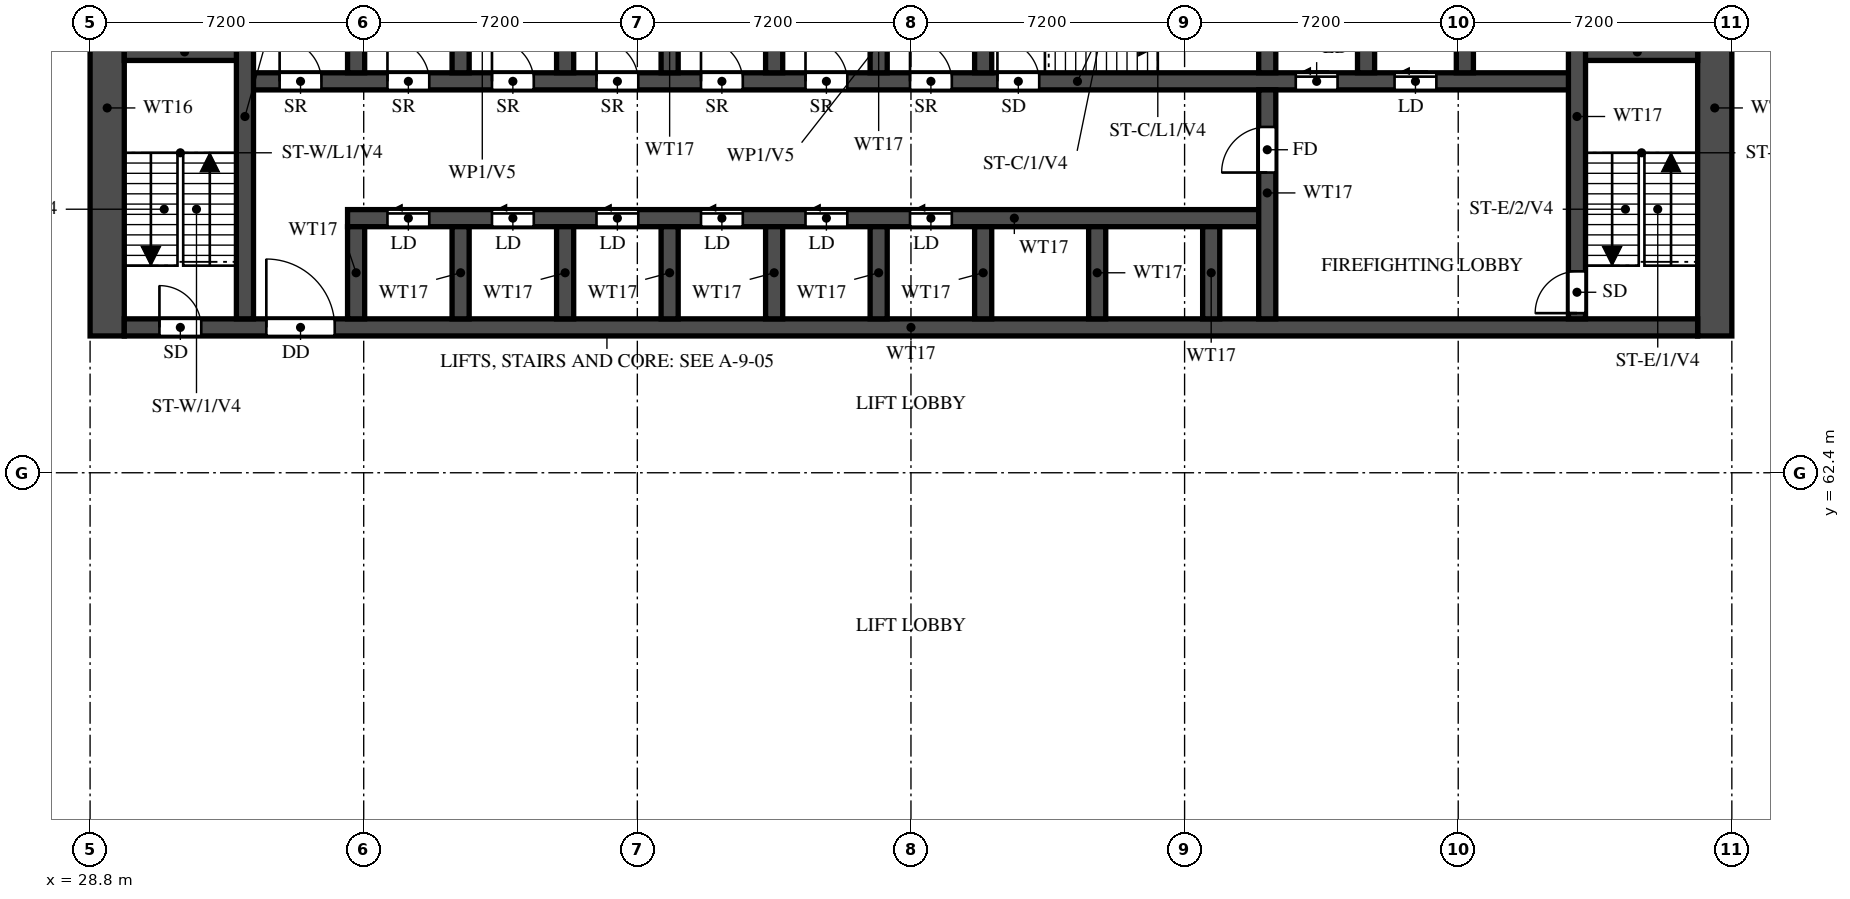
"""IFC4 building model, lengths in metres.
Left out: names, types, materials, properties, quantities, classifications, styles, units other than length and angle.
Written with IfcOpenShell. Run it as: python <this file> out.ifc"""

import sys

from ifc_helpers import new_model, si_unit, direction, frame, frame_2d, origin, place, context, subcontext, project, spatial, rectangle, extrude, element, fill, save


model = new_model("IFC4")
c1 = context("Model", 3, precision=1e-05, world=origin(), true_north=direction((0.0, 1.0)))
c2 = subcontext(c1, "Body", "Model", "MODEL_VIEW")
j1 = project(units=[si_unit("LENGTHUNIT", "METRE"), si_unit("PLANEANGLEUNIT", "RADIAN")], contexts=[c1])
p1 = place(None, origin())
s1 = spatial("IfcSite", under=j1, at=p1, CompositionType="ELEMENT")
p2 = place(p1, origin())
s2 = spatial("IfcBuilding", under=s1, at=p2, CompositionType="ELEMENT")
p3 = place(p2, frame((0.0, 0.0, 17.4)))
s3 = spatial("IfcBuildingStorey", under=s2, at=p3, CompositionType="ELEMENT", Elevation=17.4)
for number, where, z_axis, x_axis in (
    (1, (29.25, 66.0, 0.0), (0.0, 0.0, 1.0), (0.0, 1.0, 0.0)),
    (2, (71.55, 66.0, 0.0), (0.0, 0.0, 1.0), (0.0, 1.0, 0.0)),
):
    element("IfcWall", number, at=place(p3, frame(where, z_axis=z_axis, x_axis=x_axis)), inside=s3, PredefinedType="SHEAR", context=c2, shape_type="SweptSolid", body=[
        extrude(rectangle(XDim=12.0, YDim=0.9, at=frame_2d((6.0, 0.0))), origin(), (0.0, 0.0, 1.0), 3.8),
    ])
p4 = place(p3, frame((29.7, 66.225, 0.0), z_axis=(0.0, 0.0, 1.0), x_axis=(1.0, 0.0, 0.0)))
e3 = element("IfcWall", 3, at=p4, inside=s3, PredefinedType="SHEAR", context=c2, shape_type="SweptSolid", body=[
    extrude(rectangle(XDim=41.4, YDim=0.45, at=frame_2d((20.7, 0.0))), origin(), (0.0, 0.0, 1.0), 3.8),
])
p5 = place(p4, frame((0.925, 0.0, 0.0)))
e4 = element("IfcOpeningElement", 4, at=p5, cuts=e3, PredefinedType="OPENING", context=c2, shape_type="SweptSolid", body=[
    extrude(rectangle(XDim=1.1, YDim=2.1, at=frame_2d((0.55, 1.05))), frame((0.0, 0.235, 0.0), z_axis=(0.0, -1.0, 0.0), x_axis=(1.0, 0.0, 0.0)), (0.0, 0.0, 1.0), 0.47),
])
p6 = place(p4, frame((3.738, 0.0, 0.0)))
e5 = element("IfcOpeningElement", 5, at=p6, cuts=e3, PredefinedType="OPENING", context=c2, shape_type="SweptSolid", body=[
    extrude(rectangle(XDim=1.8, YDim=2.1, at=frame_2d((0.9, 1.05))), frame((0.0, 0.235, 0.0), z_axis=(0.0, -1.0, 0.0), x_axis=(1.0, 0.0, 0.0)), (0.0, 0.0, 1.0), 0.47),
])
p7 = place(p3, frame((35.575, 69.1, 0.0), z_axis=(0.0, 0.0, 1.0), x_axis=(1.0, 0.0, 0.0)))
e6 = element("IfcWall", 6, at=p7, inside=s3, PredefinedType="SHEAR", context=c2, shape_type="SweptSolid", body=[
    extrude(rectangle(XDim=24.2, YDim=0.45, at=frame_2d((12.1, 0.0))), origin(), (0.0, 0.0, 1.0), 3.8),
])
p8 = place(p7, frame((1.05, 0.0, 0.0)))
e7 = element("IfcOpeningElement", 7, at=p8, cuts=e6, PredefinedType="OPENING", context=c2, shape_type="SweptSolid", body=[
    extrude(rectangle(XDim=1.1, YDim=2.1, at=frame_2d((0.55, 1.05))), frame((0.0, 0.235, 0.0), z_axis=(0.0, -1.0, 0.0), x_axis=(1.0, 0.0, 0.0)), (0.0, 0.0, 1.0), 0.47),
])
p9 = place(p7, frame((3.8, 0.0, 0.0)))
e8 = element("IfcOpeningElement", 8, at=p9, cuts=e6, PredefinedType="OPENING", context=c2, shape_type="SweptSolid", body=[
    extrude(rectangle(XDim=1.1, YDim=2.1, at=frame_2d((0.55, 1.05))), frame((0.0, 0.235, 0.0), z_axis=(0.0, -1.0, 0.0), x_axis=(1.0, 0.0, 0.0)), (0.0, 0.0, 1.0), 0.47),
])
p10 = place(p7, frame((6.55, 0.0, 0.0)))
e9 = element("IfcOpeningElement", 9, at=p10, cuts=e6, PredefinedType="OPENING", context=c2, shape_type="SweptSolid", body=[
    extrude(rectangle(XDim=1.1, YDim=2.1, at=frame_2d((0.55, 1.05))), frame((0.0, 0.235, 0.0), z_axis=(0.0, -1.0, 0.0), x_axis=(1.0, 0.0, 0.0)), (0.0, 0.0, 1.0), 0.47),
])
p11 = place(p7, frame((9.3, 0.0, 0.0)))
e10 = element("IfcOpeningElement", 10, at=p11, cuts=e6, PredefinedType="OPENING", context=c2, shape_type="SweptSolid", body=[
    extrude(rectangle(XDim=1.1, YDim=2.1, at=frame_2d((0.55, 1.05))), frame((0.0, 0.235, 0.0), z_axis=(0.0, -1.0, 0.0), x_axis=(1.0, 0.0, 0.0)), (0.0, 0.0, 1.0), 0.47),
])
p12 = place(p7, frame((12.05, 0.0, 0.0)))
e11 = element("IfcOpeningElement", 11, at=p12, cuts=e6, PredefinedType="OPENING", context=c2, shape_type="SweptSolid", body=[
    extrude(rectangle(XDim=1.1, YDim=2.1, at=frame_2d((0.55, 1.05))), frame((0.0, 0.235, 0.0), z_axis=(0.0, -1.0, 0.0), x_axis=(1.0, 0.0, 0.0)), (0.0, 0.0, 1.0), 0.47),
])
p13 = place(p7, frame((14.8, 0.0, 0.0)))
e12 = element("IfcOpeningElement", 12, at=p13, cuts=e6, PredefinedType="OPENING", context=c2, shape_type="SweptSolid", body=[
    extrude(rectangle(XDim=1.1, YDim=2.1, at=frame_2d((0.55, 1.05))), frame((0.0, 0.235, 0.0), z_axis=(0.0, -1.0, 0.0), x_axis=(1.0, 0.0, 0.0)), (0.0, 0.0, 1.0), 0.47),
])
p14 = place(p3, frame((32.875, 72.7, 0.0), z_axis=(0.0, 0.0, 1.0), x_axis=(1.0, 0.0, 0.0)))
e13 = element("IfcWall", 13, at=p14, inside=s3, PredefinedType="SHEAR", context=c2, shape_type="SweptSolid", body=[
    extrude(rectangle(XDim=35.05, YDim=0.45, at=frame_2d((17.525, 0.0))), origin(), (0.0, 0.0, 1.0), 3.8),
])
p15 = place(p14, frame((19.8, 0.0, 0.0)))
e14 = element("IfcOpeningElement", 14, at=p15, cuts=e13, PredefinedType="OPENING", context=c2, shape_type="SweptSolid", body=[
    extrude(rectangle(XDim=1.1, YDim=2.1, at=frame_2d((0.55, 1.05))), frame((0.0, 0.235, 0.0), z_axis=(0.0, -1.0, 0.0), x_axis=(1.0, 0.0, 0.0)), (0.0, 0.0, 1.0), 0.47),
])
p16 = place(p14, frame((27.65, 0.0, 0.0)))
e15 = element("IfcOpeningElement", 15, at=p16, cuts=e13, PredefinedType="OPENING", context=c2, shape_type="SweptSolid", body=[
    extrude(rectangle(XDim=1.1, YDim=2.1, at=frame_2d((0.55, 1.05))), frame((0.0, 0.235, 0.0), z_axis=(0.0, -1.0, 0.0), x_axis=(1.0, 0.0, 0.0)), (0.0, 0.0, 1.0), 0.47),
])
p17 = place(p14, frame((30.25, 0.0, 0.0)))
e16 = element("IfcOpeningElement", 16, at=p17, cuts=e13, PredefinedType="OPENING", context=c2, shape_type="SweptSolid", body=[
    extrude(rectangle(XDim=1.1, YDim=2.1, at=frame_2d((0.55, 1.05))), frame((0.0, 0.235, 0.0), z_axis=(0.0, -1.0, 0.0), x_axis=(1.0, 0.0, 0.0)), (0.0, 0.0, 1.0), 0.47),
])
p18 = place(p14, frame((3.75, 0.0, 0.0)))
e17 = element("IfcOpeningElement", 17, at=p18, cuts=e13, PredefinedType="OPENING", context=c2, shape_type="SweptSolid", body=[
    extrude(rectangle(XDim=1.1, YDim=2.1, at=frame_2d((0.55, 1.05))), frame((0.0, 0.235, 0.0), z_axis=(0.0, -1.0, 0.0), x_axis=(1.0, 0.0, 0.0)), (0.0, 0.0, 1.0), 0.47),
])
p19 = place(p14, frame((6.5, 0.0, 0.0)))
e18 = element("IfcOpeningElement", 18, at=p19, cuts=e13, PredefinedType="OPENING", context=c2, shape_type="SweptSolid", body=[
    extrude(rectangle(XDim=1.1, YDim=2.1, at=frame_2d((0.55, 1.05))), frame((0.0, 0.235, 0.0), z_axis=(0.0, -1.0, 0.0), x_axis=(1.0, 0.0, 0.0)), (0.0, 0.0, 1.0), 0.47),
])
p20 = place(p14, frame((9.25, 0.0, 0.0)))
e19 = element("IfcOpeningElement", 19, at=p20, cuts=e13, PredefinedType="OPENING", context=c2, shape_type="SweptSolid", body=[
    extrude(rectangle(XDim=1.1, YDim=2.1, at=frame_2d((0.55, 1.05))), frame((0.0, 0.235, 0.0), z_axis=(0.0, -1.0, 0.0), x_axis=(1.0, 0.0, 0.0)), (0.0, 0.0, 1.0), 0.47),
])
p21 = place(p14, frame((12.0, 0.0, 0.0)))
e20 = element("IfcOpeningElement", 20, at=p21, cuts=e13, PredefinedType="OPENING", context=c2, shape_type="SweptSolid", body=[
    extrude(rectangle(XDim=1.1, YDim=2.1, at=frame_2d((0.55, 1.05))), frame((0.0, 0.235, 0.0), z_axis=(0.0, -1.0, 0.0), x_axis=(1.0, 0.0, 0.0)), (0.0, 0.0, 1.0), 0.47),
])
p22 = place(p14, frame((14.75, 0.0, 0.0)))
e21 = element("IfcOpeningElement", 21, at=p22, cuts=e13, PredefinedType="OPENING", context=c2, shape_type="SweptSolid", body=[
    extrude(rectangle(XDim=1.1, YDim=2.1, at=frame_2d((0.55, 1.05))), frame((0.0, 0.235, 0.0), z_axis=(0.0, -1.0, 0.0), x_axis=(1.0, 0.0, 0.0)), (0.0, 0.0, 1.0), 0.47),
])
p23 = place(p14, frame((17.5, 0.0, 0.0)))
e22 = element("IfcOpeningElement", 22, at=p23, cuts=e13, PredefinedType="OPENING", context=c2, shape_type="SweptSolid", body=[
    extrude(rectangle(XDim=1.1, YDim=2.1, at=frame_2d((0.55, 1.05))), frame((0.0, 0.235, 0.0), z_axis=(0.0, -1.0, 0.0), x_axis=(1.0, 0.0, 0.0)), (0.0, 0.0, 1.0), 0.47),
])
p24 = place(p14, frame((0.913, 0.0, 0.0)))
e23 = element("IfcOpeningElement", 23, at=p24, cuts=e13, PredefinedType="OPENING", context=c2, shape_type="SweptSolid", body=[
    extrude(rectangle(XDim=1.1, YDim=2.1, at=frame_2d((0.55, 1.05))), frame((0.0, 0.235, 0.0), z_axis=(0.0, -1.0, 0.0), x_axis=(1.0, 0.0, 0.0)), (0.0, 0.0, 1.0), 0.47),
])
for number, where, z_axis, x_axis in (
    (24, (29.7, 73.475, 0.0), (0.0, 0.0, 1.0), (1.0, 0.0, 0.0)),
    (25, (67.925, 73.475, 0.0), (0.0, 0.0, 1.0), (1.0, 0.0, 0.0)),
):
    element("IfcWall", number, at=place(p3, frame(where, z_axis=z_axis, x_axis=x_axis)), inside=s3, PredefinedType="SHEAR", context=c2, shape_type="SweptSolid", body=[
        extrude(rectangle(XDim=3.175, YDim=0.45, at=frame_2d((1.587, 0.0))), origin(), (0.0, 0.0, 1.0), 3.8),
    ])
p25 = place(p3, frame((32.875, 66.45, 0.0), z_axis=(0.0, 0.0, 1.0), x_axis=(0.0, 1.0, 0.0)))
e26 = element("IfcWall", 26, at=p25, inside=s3, PredefinedType="SHEAR", context=c2, shape_type="SweptSolid", body=[
    extrude(rectangle(XDim=10.65, YDim=0.45, at=frame_2d((5.325, 0.0))), origin(), (0.0, 0.0, 1.0), 3.8),
])
p26 = place(p3, frame((67.925, 66.45, 0.0), z_axis=(0.0, 0.0, 1.0), x_axis=(0.0, 1.0, 0.0)))
e27 = element("IfcWall", 27, at=p26, inside=s3, PredefinedType="SHEAR", context=c2, shape_type="SweptSolid", body=[
    extrude(rectangle(XDim=10.65, YDim=0.45, at=frame_2d((5.325, 0.0))), origin(), (0.0, 0.0, 1.0), 3.8),
])
p27 = place(p26, frame((0.15, 0.0, 0.0)))
e28 = element("IfcOpeningElement", 28, at=p27, cuts=e27, PredefinedType="OPENING", context=c2, shape_type="SweptSolid", body=[
    extrude(rectangle(XDim=1.1, YDim=2.1, at=frame_2d((0.55, 1.05))), frame((0.0, 0.235, 0.0), z_axis=(0.0, -1.0, 0.0), x_axis=(1.0, 0.0, 0.0)), (0.0, 0.0, 1.0), 0.47),
])
p28 = place(p3, frame((59.775, 66.45, 0.0), z_axis=(0.0, 0.0, 1.0), x_axis=(0.0, 1.0, 0.0)))
e29 = element("IfcWall", 29, at=p28, inside=s3, PredefinedType="SHEAR", context=c2, shape_type="SweptSolid", body=[
    extrude(rectangle(XDim=6.025, YDim=0.45, at=frame_2d((3.013, 0.0))), origin(), (0.0, 0.0, 1.0), 3.8),
])
p29 = place(p28, frame((3.85, 0.0, 0.0)))
e30 = element("IfcOpeningElement", 30, at=p29, cuts=e29, PredefinedType="OPENING", context=c2, shape_type="SweptSolid", body=[
    extrude(rectangle(XDim=1.2, YDim=2.1, at=frame_2d((0.6, 1.05))), frame((0.0, 0.235, 0.0), z_axis=(0.0, -1.0, 0.0), x_axis=(1.0, 0.0, 0.0)), (0.0, 0.0, 1.0), 0.47),
])
p30 = place(p3, frame((59.775, 72.925, 0.0), z_axis=(0.0, 0.0, 1.0), x_axis=(0.0, 1.0, 0.0)))
e31 = element("IfcWall", 31, at=p30, inside=s3, PredefinedType="SHEAR", context=c2, shape_type="SweptSolid", body=[
    extrude(rectangle(XDim=2.95, YDim=0.45, at=frame_2d((1.475, 0.0))), origin(), (0.0, 0.0, 1.0), 3.8),
])
for number, where, z_axis, x_axis in (
    (32, (35.8, 66.45, 0.0), (0.0, 0.0, 1.0), (0.0, 1.0, 0.0)),
    (33, (38.55, 66.45, 0.0), (0.0, 0.0, 1.0), (0.0, 1.0, 0.0)),
    (34, (41.3, 66.45, 0.0), (0.0, 0.0, 1.0), (0.0, 1.0, 0.0)),
    (35, (44.05, 66.45, 0.0), (0.0, 0.0, 1.0), (0.0, 1.0, 0.0)),
    (36, (46.8, 66.45, 0.0), (0.0, 0.0, 1.0), (0.0, 1.0, 0.0)),
    (37, (49.55, 66.45, 0.0), (0.0, 0.0, 1.0), (0.0, 1.0, 0.0)),
    (38, (52.3, 66.45, 0.0), (0.0, 0.0, 1.0), (0.0, 1.0, 0.0)),
    (39, (55.3, 66.45, 0.0), (0.0, 0.0, 1.0), (0.0, 1.0, 0.0)),
    (40, (58.3, 66.45, 0.0), (0.0, 0.0, 1.0), (0.0, 1.0, 0.0)),
):
    element("IfcWall", number, at=place(p3, frame(where, z_axis=z_axis, x_axis=x_axis)), inside=s3, PredefinedType="SHEAR", context=c2, shape_type="SweptSolid", body=[
        extrude(rectangle(XDim=2.425, YDim=0.45, at=frame_2d((1.212, 0.0))), origin(), (0.0, 0.0, 1.0), 3.8),
    ])
for number, where, z_axis, x_axis in (
    (41, (35.8, 72.925, 0.0), (0.0, 0.0, 1.0), (0.0, 1.0, 0.0)),
    (42, (38.55, 72.925, 0.0), (0.0, 0.0, 1.0), (0.0, 1.0, 0.0)),
    (43, (41.3, 72.925, 0.0), (0.0, 0.0, 1.0), (0.0, 1.0, 0.0)),
    (44, (44.05, 72.925, 0.0), (0.0, 0.0, 1.0), (0.0, 1.0, 0.0)),
    (45, (46.8, 72.925, 0.0), (0.0, 0.0, 1.0), (0.0, 1.0, 0.0)),
    (46, (49.55, 72.925, 0.0), (0.0, 0.0, 1.0), (0.0, 1.0, 0.0)),
    (47, (52.3, 72.925, 0.0), (0.0, 0.0, 1.0), (0.0, 1.0, 0.0)),
    (48, (62.375, 72.925, 0.0), (0.0, 0.0, 1.0), (0.0, 1.0, 0.0)),
    (49, (64.975, 72.925, 0.0), (0.0, 0.0, 1.0), (0.0, 1.0, 0.0)),
):
    element("IfcWall", number, at=place(p3, frame(where, z_axis=z_axis, x_axis=x_axis)), inside=s3, PredefinedType="SHEAR", context=c2, shape_type="SweptSolid", body=[
        extrude(rectangle(XDim=2.95, YDim=0.45, at=frame_2d((1.475, 0.0))), origin(), (0.0, 0.0, 1.0), 3.8),
    ])
p31 = place(p5, origin())
e50 = element("IfcDoor", 50, at=p31, inside=s3, OperationType="SINGLE_SWING_LEFT", PredefinedType="DOOR", context=c2, shape_type="SweptSolid", body=[
    extrude(rectangle(XDim=1.1, YDim=2.1, at=frame_2d((0.55, 1.05))), frame((0.0, 0.025, 0.0), z_axis=(0.0, -1.0, 0.0), x_axis=(1.0, 0.0, 0.0)), (0.0, 0.0, 1.0), 0.05),
])
fill(e4, e50)
p32 = place(p15, origin())
e51 = element("IfcDoor", 51, at=p32, inside=s3, OperationType="SINGLE_SWING_LEFT", PredefinedType="DOOR", context=c2, shape_type="SweptSolid", body=[
    extrude(rectangle(XDim=1.1, YDim=2.1, at=frame_2d((0.55, 1.05))), frame((0.0, 0.025, 0.0), z_axis=(0.0, -1.0, 0.0), x_axis=(1.0, 0.0, 0.0)), (0.0, 0.0, 1.0), 0.05),
])
fill(e14, e51)
p33 = place(p27, origin())
e52 = element("IfcDoor", 52, at=p33, inside=s3, OperationType="SINGLE_SWING_LEFT", PredefinedType="DOOR", context=c2, shape_type="SweptSolid", body=[
    extrude(rectangle(XDim=1.1, YDim=2.1, at=frame_2d((0.55, 1.05))), frame((0.0, 0.025, 0.0), z_axis=(0.0, -1.0, 0.0), x_axis=(1.0, 0.0, 0.0)), (0.0, 0.0, 1.0), 0.05),
])
fill(e28, e52)
p34 = place(p6, origin())
e53 = element("IfcDoor", 53, at=p34, inside=s3, OperationType="DOUBLE_DOOR_SINGLE_SWING", PredefinedType="DOOR", context=c2, shape_type="SweptSolid", body=[
    extrude(rectangle(XDim=1.8, YDim=2.1, at=frame_2d((0.9, 1.05))), frame((0.0, 0.025, 0.0), z_axis=(0.0, -1.0, 0.0), x_axis=(1.0, 0.0, 0.0)), (0.0, 0.0, 1.0), 0.05),
])
fill(e5, e53)
p35 = place(p29, origin())
e54 = element("IfcDoor", 54, at=p35, inside=s3, OperationType="SINGLE_SWING_RIGHT", PredefinedType="DOOR", context=c2, shape_type="SweptSolid", body=[
    extrude(rectangle(XDim=1.2, YDim=2.1, at=frame_2d((0.6, 1.05))), frame((0.0, 0.025, 0.0), z_axis=(0.0, -1.0, 0.0), x_axis=(1.0, 0.0, 0.0)), (0.0, 0.0, 1.0), 0.05),
])
fill(e30, e54)
p36 = place(p16, origin())
e55 = element("IfcDoor", 55, at=p36, inside=s3, OperationType="SLIDING_TO_LEFT", PredefinedType="DOOR", context=c2, shape_type="SweptSolid", body=[
    extrude(rectangle(XDim=1.1, YDim=2.1, at=frame_2d((0.55, 1.05))), frame((0.0, 0.025, 0.0), z_axis=(0.0, -1.0, 0.0), x_axis=(1.0, 0.0, 0.0)), (0.0, 0.0, 1.0), 0.05),
])
fill(e15, e55)
p37 = place(p17, origin())
e56 = element("IfcDoor", 56, at=p37, inside=s3, OperationType="SLIDING_TO_LEFT", PredefinedType="DOOR", context=c2, shape_type="SweptSolid", body=[
    extrude(rectangle(XDim=1.1, YDim=2.1, at=frame_2d((0.55, 1.05))), frame((0.0, 0.025, 0.0), z_axis=(0.0, -1.0, 0.0), x_axis=(1.0, 0.0, 0.0)), (0.0, 0.0, 1.0), 0.05),
])
fill(e16, e56)
p38 = place(p8, origin())
e57 = element("IfcDoor", 57, at=p38, inside=s3, OperationType="SLIDING_TO_LEFT", PredefinedType="DOOR", context=c2, shape_type="SweptSolid", body=[
    extrude(rectangle(XDim=1.1, YDim=2.1, at=frame_2d((0.55, 1.05))), frame((0.0, 0.025, 0.0), z_axis=(0.0, -1.0, 0.0), x_axis=(1.0, 0.0, 0.0)), (0.0, 0.0, 1.0), 0.05),
])
fill(e7, e57)
p39 = place(p9, origin())
e58 = element("IfcDoor", 58, at=p39, inside=s3, OperationType="SLIDING_TO_LEFT", PredefinedType="DOOR", context=c2, shape_type="SweptSolid", body=[
    extrude(rectangle(XDim=1.1, YDim=2.1, at=frame_2d((0.55, 1.05))), frame((0.0, 0.025, 0.0), z_axis=(0.0, -1.0, 0.0), x_axis=(1.0, 0.0, 0.0)), (0.0, 0.0, 1.0), 0.05),
])
fill(e8, e58)
p40 = place(p10, origin())
e59 = element("IfcDoor", 59, at=p40, inside=s3, OperationType="SLIDING_TO_LEFT", PredefinedType="DOOR", context=c2, shape_type="SweptSolid", body=[
    extrude(rectangle(XDim=1.1, YDim=2.1, at=frame_2d((0.55, 1.05))), frame((0.0, 0.025, 0.0), z_axis=(0.0, -1.0, 0.0), x_axis=(1.0, 0.0, 0.0)), (0.0, 0.0, 1.0), 0.05),
])
fill(e9, e59)
p41 = place(p11, origin())
e60 = element("IfcDoor", 60, at=p41, inside=s3, OperationType="SLIDING_TO_LEFT", PredefinedType="DOOR", context=c2, shape_type="SweptSolid", body=[
    extrude(rectangle(XDim=1.1, YDim=2.1, at=frame_2d((0.55, 1.05))), frame((0.0, 0.025, 0.0), z_axis=(0.0, -1.0, 0.0), x_axis=(1.0, 0.0, 0.0)), (0.0, 0.0, 1.0), 0.05),
])
fill(e10, e60)
p42 = place(p12, origin())
e61 = element("IfcDoor", 61, at=p42, inside=s3, OperationType="SLIDING_TO_LEFT", PredefinedType="DOOR", context=c2, shape_type="SweptSolid", body=[
    extrude(rectangle(XDim=1.1, YDim=2.1, at=frame_2d((0.55, 1.05))), frame((0.0, 0.025, 0.0), z_axis=(0.0, -1.0, 0.0), x_axis=(1.0, 0.0, 0.0)), (0.0, 0.0, 1.0), 0.05),
])
fill(e11, e61)
p43 = place(p13, origin())
e62 = element("IfcDoor", 62, at=p43, inside=s3, OperationType="SLIDING_TO_LEFT", PredefinedType="DOOR", context=c2, shape_type="SweptSolid", body=[
    extrude(rectangle(XDim=1.1, YDim=2.1, at=frame_2d((0.55, 1.05))), frame((0.0, 0.025, 0.0), z_axis=(0.0, -1.0, 0.0), x_axis=(1.0, 0.0, 0.0)), (0.0, 0.0, 1.0), 0.05),
])
fill(e12, e62)
p44 = place(p18, origin())
e63 = element("IfcDoor", 63, at=p44, inside=s3, OperationType="SINGLE_SWING_LEFT", PredefinedType="DOOR", context=c2, shape_type="SweptSolid", body=[
    extrude(rectangle(XDim=1.1, YDim=2.1, at=frame_2d((0.55, 1.05))), frame((0.0, 0.025, 0.0), z_axis=(0.0, -1.0, 0.0), x_axis=(1.0, 0.0, 0.0)), (0.0, 0.0, 1.0), 0.05),
])
fill(e17, e63)
p45 = place(p19, origin())
e64 = element("IfcDoor", 64, at=p45, inside=s3, OperationType="SINGLE_SWING_LEFT", PredefinedType="DOOR", context=c2, shape_type="SweptSolid", body=[
    extrude(rectangle(XDim=1.1, YDim=2.1, at=frame_2d((0.55, 1.05))), frame((0.0, 0.025, 0.0), z_axis=(0.0, -1.0, 0.0), x_axis=(1.0, 0.0, 0.0)), (0.0, 0.0, 1.0), 0.05),
])
fill(e18, e64)
p46 = place(p20, origin())
e65 = element("IfcDoor", 65, at=p46, inside=s3, OperationType="SINGLE_SWING_LEFT", PredefinedType="DOOR", context=c2, shape_type="SweptSolid", body=[
    extrude(rectangle(XDim=1.1, YDim=2.1, at=frame_2d((0.55, 1.05))), frame((0.0, 0.025, 0.0), z_axis=(0.0, -1.0, 0.0), x_axis=(1.0, 0.0, 0.0)), (0.0, 0.0, 1.0), 0.05),
])
fill(e19, e65)
p47 = place(p21, origin())
e66 = element("IfcDoor", 66, at=p47, inside=s3, OperationType="SINGLE_SWING_LEFT", PredefinedType="DOOR", context=c2, shape_type="SweptSolid", body=[
    extrude(rectangle(XDim=1.1, YDim=2.1, at=frame_2d((0.55, 1.05))), frame((0.0, 0.025, 0.0), z_axis=(0.0, -1.0, 0.0), x_axis=(1.0, 0.0, 0.0)), (0.0, 0.0, 1.0), 0.05),
])
fill(e20, e66)
p48 = place(p22, origin())
e67 = element("IfcDoor", 67, at=p48, inside=s3, OperationType="SINGLE_SWING_LEFT", PredefinedType="DOOR", context=c2, shape_type="SweptSolid", body=[
    extrude(rectangle(XDim=1.1, YDim=2.1, at=frame_2d((0.55, 1.05))), frame((0.0, 0.025, 0.0), z_axis=(0.0, -1.0, 0.0), x_axis=(1.0, 0.0, 0.0)), (0.0, 0.0, 1.0), 0.05),
])
fill(e21, e67)
p49 = place(p23, origin())
e68 = element("IfcDoor", 68, at=p49, inside=s3, OperationType="SINGLE_SWING_LEFT", PredefinedType="DOOR", context=c2, shape_type="SweptSolid", body=[
    extrude(rectangle(XDim=1.1, YDim=2.1, at=frame_2d((0.55, 1.05))), frame((0.0, 0.025, 0.0), z_axis=(0.0, -1.0, 0.0), x_axis=(1.0, 0.0, 0.0)), (0.0, 0.0, 1.0), 0.05),
])
fill(e22, e68)
p50 = place(p24, origin())
e69 = element("IfcDoor", 69, at=p50, inside=s3, OperationType="SINGLE_SWING_LEFT", PredefinedType="DOOR", context=c2, shape_type="SweptSolid", body=[
    extrude(rectangle(XDim=1.1, YDim=2.1, at=frame_2d((0.55, 1.05))), frame((0.0, 0.025, 0.0), z_axis=(0.0, -1.0, 0.0), x_axis=(1.0, 0.0, 0.0)), (0.0, 0.0, 1.0), 0.05),
])
fill(e23, e69)
save(model, sys.argv[1])
